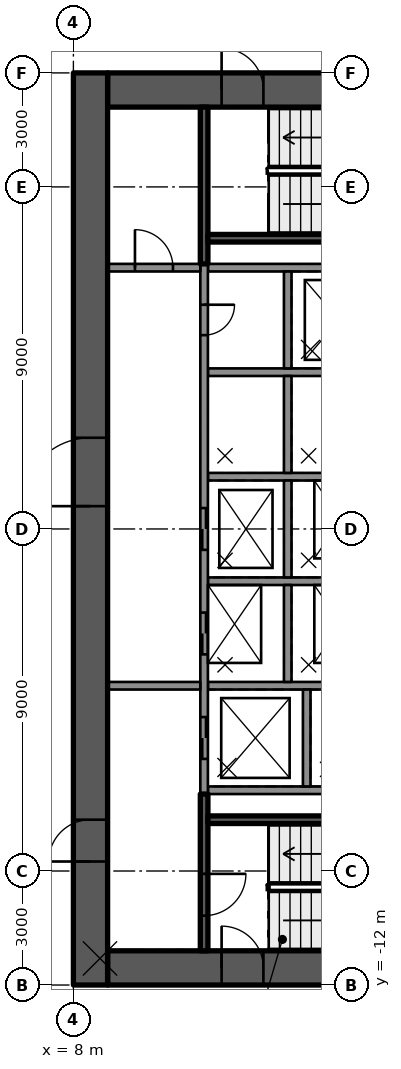
"""IFC4 building model, lengths in metres.
Left out: names, types, materials, properties, quantities, classifications, styles, units other than length and angle.
Written with IfcOpenShell. Run it as: python <this file> out.ifc"""

import sys

from ifc_helpers import new_model, si_unit, direction, frame, frame_2d, origin, place, context, subcontext, project, spatial, rectangle, extrude, element, fill, save


model = new_model("IFC4")
c1 = context("Model", 3, precision=1e-05, world=origin(), true_north=direction((0.0, 1.0)))
c2 = subcontext(c1, "Body", "Model", "MODEL_VIEW")
j1 = project(units=[si_unit("LENGTHUNIT", "METRE"), si_unit("PLANEANGLEUNIT", "RADIAN")], contexts=[c1])
p1 = place(None, origin())
s1 = spatial("IfcSite", under=j1, at=p1, CompositionType="ELEMENT")
p2 = place(p1, origin())
s2 = spatial("IfcBuilding", under=s1, at=p2, CompositionType="ELEMENT")
p3 = place(p2, frame((0.0, 0.0, 58.8)))
s3 = spatial("IfcBuildingStorey", under=s2, at=p3, CompositionType="ELEMENT", Elevation=58.8)
p4 = place(p3, frame((8.9, 11.55, 0.0), z_axis=(0.0, 0.0, 1.0), x_axis=(1.0, 0.0, 0.0)))
e1 = element("IfcWall", 1, at=p4, inside=s3, PredefinedType="SHEAR", context=c2, shape_type="SweptSolid", body=[
    extrude(rectangle(XDim=9.2, YDim=0.9, at=frame_2d((4.6, 0.0))), origin(), (0.0, 0.0, 1.0), 3.5),
])
p5 = place(p4, frame((3.0, 0.0, 0.0)))
e2 = element("IfcOpeningElement", 2, at=p5, cuts=e1, PredefinedType="OPENING", context=c2, shape_type="SweptSolid", body=[
    extrude(rectangle(XDim=1.1, YDim=2.1, at=frame_2d((0.55, 1.05))), frame((0.0, 0.46, 0.0), z_axis=(0.0, -1.0, 0.0), x_axis=(1.0, 0.0, 0.0)), (0.0, 0.0, 1.0), 0.92),
])
p6 = place(p3, frame((8.9, -11.55, 0.0), z_axis=(0.0, 0.0, 1.0), x_axis=(1.0, 0.0, 0.0)))
e3 = element("IfcWall", 3, at=p6, inside=s3, PredefinedType="SHEAR", context=c2, shape_type="SweptSolid", body=[
    extrude(rectangle(XDim=9.2, YDim=0.9, at=frame_2d((4.6, 0.0))), origin(), (0.0, 0.0, 1.0), 3.5),
])
p7 = place(p6, frame((3.0, 0.0, 0.0)))
e4 = element("IfcOpeningElement", 4, at=p7, cuts=e3, PredefinedType="OPENING", context=c2, shape_type="SweptSolid", body=[
    extrude(rectangle(XDim=1.1, YDim=2.1, at=frame_2d((0.55, 1.05))), frame((0.0, 0.46, 0.0), z_axis=(0.0, -1.0, 0.0), x_axis=(1.0, 0.0, 0.0)), (0.0, 0.0, 1.0), 0.92),
])
p8 = place(p3, frame((8.45, -12.0, 0.0), z_axis=(0.0, 0.0, 1.0), x_axis=(0.0, 1.0, 0.0)))
e5 = element("IfcWall", 5, at=p8, inside=s3, PredefinedType="SHEAR", context=c2, shape_type="SweptSolid", body=[
    extrude(rectangle(XDim=24.0, YDim=0.9, at=frame_2d((12.0, 0.0))), origin(), (0.0, 0.0, 1.0), 3.5),
])
p9 = place(p8, frame((12.6, 0.0, 0.0)))
e6 = element("IfcOpeningElement", 6, at=p9, cuts=e5, PredefinedType="OPENING", context=c2, shape_type="SweptSolid", body=[
    extrude(rectangle(XDim=1.8, YDim=2.1, at=frame_2d((0.9, 1.05))), frame((0.0, 0.46, 0.0), z_axis=(0.0, -1.0, 0.0), x_axis=(1.0, 0.0, 0.0)), (0.0, 0.0, 1.0), 0.92),
])
p10 = place(p8, frame((3.25, 0.0, 0.0)))
e7 = element("IfcOpeningElement", 7, at=p10, cuts=e5, PredefinedType="OPENING", context=c2, shape_type="SweptSolid", body=[
    extrude(rectangle(XDim=1.1, YDim=2.1, at=frame_2d((0.55, 1.05))), frame((0.0, 0.46, 0.0), z_axis=(0.0, -1.0, 0.0), x_axis=(1.0, 0.0, 0.0)), (0.0, 0.0, 1.0), 0.92),
])
for number, where, z_axis, x_axis in (
    (8, (11.54, -6.875, 0.0), (0.0, 0.0, 1.0), (1.0, 0.0, 0.0)),
    (9, (11.54, 6.875, 0.0), (0.0, 0.0, 1.0), (1.0, 0.0, 0.0)),
):
    element("IfcWall", number, at=place(p3, frame(where, z_axis=z_axis, x_axis=x_axis)), inside=s3, PredefinedType="SOLIDWALL", context=c2, shape_type="SweptSolid", body=[
        extrude(rectangle(XDim=6.56, YDim=0.2, at=frame_2d((3.28, 0.0))), origin(), (0.0, 0.0, 1.0), 3.09),
    ])
p11 = place(p3, frame((11.54, 4.125, 0.0), z_axis=(0.0, 0.0, 1.0), x_axis=(1.0, 0.0, 0.0)))
e10 = element("IfcWall", 10, at=p11, inside=s3, PredefinedType="SOLIDWALL", context=c2, shape_type="SweptSolid", body=[
    extrude(rectangle(XDim=4.7, YDim=0.2, at=frame_2d((2.35, 0.0))), origin(), (0.0, 0.0, 1.0), 3.09),
])
for number, where, z_axis, x_axis in (
    (11, (11.54, 1.375, 0.0), (0.0, 0.0, 1.0), (1.0, 0.0, 0.0)),
    (12, (11.54, -1.375, 0.0), (0.0, 0.0, 1.0), (1.0, 0.0, 0.0)),
):
    element("IfcWall", number, at=place(p3, frame(where, z_axis=z_axis, x_axis=x_axis)), inside=s3, PredefinedType="SOLIDWALL", context=c2, shape_type="SweptSolid", body=[
        extrude(rectangle(XDim=4.2, YDim=0.2, at=frame_2d((2.1, 0.0))), origin(), (0.0, 0.0, 1.0), 3.09),
    ])
p12 = place(p3, frame((11.54, -4.125, 0.0), z_axis=(0.0, 0.0, 1.0), x_axis=(1.0, 0.0, 0.0)))
e13 = element("IfcWall", 13, at=p12, inside=s3, PredefinedType="SOLIDWALL", context=c2, shape_type="SweptSolid", body=[
    extrude(rectangle(XDim=4.7, YDim=0.2, at=frame_2d((2.35, 0.0))), origin(), (0.0, 0.0, 1.0), 3.09),
])
p13 = place(p3, frame((11.44, 6.975, 0.0), z_axis=(0.0, 0.0, 1.0), x_axis=(0.0, -1.0, 0.0)))
e14 = element("IfcWall", 14, at=p13, inside=s3, PredefinedType="SOLIDWALL", context=c2, shape_type="SweptSolid", body=[
    extrude(rectangle(XDim=13.95, YDim=0.2, at=frame_2d((6.975, 0.0))), origin(), (0.0, 0.0, 1.0), 3.09),
])
p14 = place(p13, frame((6.425, 0.0, 0.0)))
e15 = element("IfcOpeningElement", 15, at=p14, cuts=e14, PredefinedType="OPENING", context=c2, shape_type="SweptSolid", body=[
    extrude(rectangle(XDim=1.1, YDim=2.1, at=frame_2d((0.55, 1.05))), frame((0.0, 0.11, 0.0), z_axis=(0.0, -1.0, 0.0), x_axis=(1.0, 0.0, 0.0)), (0.0, 0.0, 1.0), 0.22),
])
p15 = place(p13, frame((9.175, 0.0, 0.0)))
e16 = element("IfcOpeningElement", 16, at=p15, cuts=e14, PredefinedType="OPENING", context=c2, shape_type="SweptSolid", body=[
    extrude(rectangle(XDim=1.1, YDim=2.1, at=frame_2d((0.55, 1.05))), frame((0.0, 0.11, 0.0), z_axis=(0.0, -1.0, 0.0), x_axis=(1.0, 0.0, 0.0)), (0.0, 0.0, 1.0), 0.22),
])
p16 = place(p13, frame((11.925, 0.0, 0.0)))
e17 = element("IfcOpeningElement", 17, at=p16, cuts=e14, PredefinedType="OPENING", context=c2, shape_type="SweptSolid", body=[
    extrude(rectangle(XDim=1.1, YDim=2.1, at=frame_2d((0.55, 1.05))), frame((0.0, 0.11, 0.0), z_axis=(0.0, -1.0, 0.0), x_axis=(1.0, 0.0, 0.0)), (0.0, 0.0, 1.0), 0.22),
])
p17 = place(p13, frame((1.075, 0.0, 0.0)))
e18 = element("IfcOpeningElement", 18, at=p17, cuts=e14, PredefinedType="OPENING", context=c2, shape_type="SweptSolid", body=[
    extrude(rectangle(XDim=0.8, YDim=2.1, at=frame_2d((0.4, 1.05))), frame((0.0, 0.11, 0.0), z_axis=(0.0, -1.0, 0.0), x_axis=(1.0, 0.0, 0.0)), (0.0, 0.0, 1.0), 0.22),
])
for number, where, z_axis, x_axis in (
    (19, (13.64, 6.775, 0.0), (0.0, 0.0, 1.0), (0.0, -1.0, 0.0)),
    (20, (13.64, 4.025, 0.0), (0.0, 0.0, 1.0), (0.0, -1.0, 0.0)),
    (21, (13.64, 1.275, 0.0), (0.0, 0.0, 1.0), (0.0, -1.0, 0.0)),
    (22, (13.64, -1.475, 0.0), (0.0, 0.0, 1.0), (0.0, -1.0, 0.0)),
    (23, (14.14, -4.225, 0.0), (0.0, 0.0, 1.0), (0.0, -1.0, 0.0)),
):
    element("IfcWall", number, at=place(p3, frame(where, z_axis=z_axis, x_axis=x_axis)), inside=s3, PredefinedType="SOLIDWALL", context=c2, shape_type="SweptSolid", body=[
        extrude(rectangle(XDim=2.55, YDim=0.2, at=frame_2d((1.275, 0.0))), origin(), (0.0, 0.0, 1.0), 3.09),
    ])
p18 = place(p3, frame((11.44, -6.975, 0.0), z_axis=(0.0, 0.0, 1.0), x_axis=(0.0, -1.0, 0.0)))
e24 = element("IfcWall", 24, at=p18, inside=s3, PredefinedType="SOLIDWALL", context=c2, shape_type="SweptSolid", body=[
    extrude(rectangle(XDim=4.125, YDim=0.2, at=frame_2d((2.062, 0.0))), origin(), (0.0, 0.0, 1.0), 3.09),
])
p19 = place(p18, frame((2.1, 0.0, 0.0)))
e25 = element("IfcOpeningElement", 25, at=p19, cuts=e24, PredefinedType="OPENING", context=c2, shape_type="SweptSolid", body=[
    extrude(rectangle(XDim=1.1, YDim=2.1, at=frame_2d((0.55, 1.05))), frame((0.0, 0.11, 0.0), z_axis=(0.0, -1.0, 0.0), x_axis=(1.0, 0.0, 0.0)), (0.0, 0.0, 1.0), 0.22),
])
p20 = place(p3, frame((11.54, -7.65, 0.0), z_axis=(0.0, 0.0, 1.0), x_axis=(1.0, 0.0, 0.0)))
e26 = element("IfcWall", 26, at=p20, inside=s3, PredefinedType="SOLIDWALL", context=c2, shape_type="SweptSolid", body=[
    extrude(rectangle(XDim=6.56, YDim=0.2, at=frame_2d((3.28, 0.0))), origin(), (0.0, 0.0, 1.0), 3.09),
])
p21 = place(p3, frame((11.44, 11.1, 0.0), z_axis=(0.0, 0.0, 1.0), x_axis=(0.0, -1.0, 0.0)))
e27 = element("IfcWall", 27, at=p21, inside=s3, PredefinedType="SOLIDWALL", context=c2, shape_type="SweptSolid", body=[
    extrude(rectangle(XDim=4.125, YDim=0.2, at=frame_2d((2.062, 0.0))), origin(), (0.0, 0.0, 1.0), 3.09),
])
p22 = place(p3, frame((11.54, 7.65, 0.0), z_axis=(0.0, 0.0, 1.0), x_axis=(1.0, 0.0, 0.0)))
e28 = element("IfcWall", 28, at=p22, inside=s3, PredefinedType="SOLIDWALL", context=c2, shape_type="SweptSolid", body=[
    extrude(rectangle(XDim=6.56, YDim=0.2, at=frame_2d((3.28, 0.0))), origin(), (0.0, 0.0, 1.0), 3.09),
])
p23 = place(p3, frame((8.9, -4.125, 0.0), z_axis=(0.0, 0.0, 1.0), x_axis=(1.0, 0.0, 0.0)))
e29 = element("IfcWall", 29, at=p23, inside=s3, PredefinedType="PARTITIONING", context=c2, shape_type="SweptSolid", body=[
    extrude(rectangle(XDim=2.44, YDim=0.2, at=frame_2d((1.22, 0.0))), origin(), (0.0, 0.0, 1.0), 3.09),
])
p24 = place(p3, frame((8.9, 6.875, 0.0), z_axis=(0.0, 0.0, 1.0), x_axis=(1.0, 0.0, 0.0)))
e30 = element("IfcWall", 30, at=p24, inside=s3, PredefinedType="PARTITIONING", context=c2, shape_type="SweptSolid", body=[
    extrude(rectangle(XDim=2.44, YDim=0.2, at=frame_2d((1.22, 0.0))), origin(), (0.0, 0.0, 1.0), 3.09),
])
p25 = place(p24, frame((0.72, 0.0, 0.0)))
e31 = element("IfcOpeningElement", 31, at=p25, cuts=e30, PredefinedType="OPENING", context=c2, shape_type="SweptSolid", body=[
    extrude(rectangle(XDim=1.0, YDim=2.1, at=frame_2d((0.5, 1.05))), frame((0.0, 0.11, 0.0), z_axis=(0.0, -1.0, 0.0), x_axis=(1.0, 0.0, 0.0)), (0.0, 0.0, 1.0), 0.22),
])
p26 = place(p14, origin())
e32 = element("IfcDoor", 32, at=p26, inside=s3, OperationType="DOUBLE_DOOR_SLIDING", PredefinedType="DOOR", context=c2, shape_type="SweptSolid", body=[
    extrude(rectangle(XDim=1.1, YDim=2.1, at=frame_2d((0.55, 1.05))), frame((0.0, 0.025, 0.0), z_axis=(0.0, -1.0, 0.0), x_axis=(1.0, 0.0, 0.0)), (0.0, 0.0, 1.0), 0.05),
])
fill(e15, e32)
p27 = place(p15, origin())
e33 = element("IfcDoor", 33, at=p27, inside=s3, OperationType="DOUBLE_DOOR_SLIDING", PredefinedType="DOOR", context=c2, shape_type="SweptSolid", body=[
    extrude(rectangle(XDim=1.1, YDim=2.1, at=frame_2d((0.55, 1.05))), frame((0.0, 0.025, 0.0), z_axis=(0.0, -1.0, 0.0), x_axis=(1.0, 0.0, 0.0)), (0.0, 0.0, 1.0), 0.05),
])
fill(e16, e33)
p28 = place(p16, origin())
e34 = element("IfcDoor", 34, at=p28, inside=s3, OperationType="DOUBLE_DOOR_SLIDING", PredefinedType="DOOR", context=c2, shape_type="SweptSolid", body=[
    extrude(rectangle(XDim=1.1, YDim=2.1, at=frame_2d((0.55, 1.05))), frame((0.0, 0.025, 0.0), z_axis=(0.0, -1.0, 0.0), x_axis=(1.0, 0.0, 0.0)), (0.0, 0.0, 1.0), 0.05),
])
fill(e17, e34)
p29 = place(p17, origin())
e35 = element("IfcDoor", 35, at=p29, inside=s3, OperationType="SINGLE_SWING_LEFT", PredefinedType="DOOR", context=c2, shape_type="SweptSolid", body=[
    extrude(rectangle(XDim=0.8, YDim=2.1, at=frame_2d((0.4, 1.05))), frame((0.0, 0.025, 0.0), z_axis=(0.0, -1.0, 0.0), x_axis=(1.0, 0.0, 0.0)), (0.0, 0.0, 1.0), 0.05),
])
fill(e18, e35)
p30 = place(p9, origin())
e36 = element("IfcDoor", 36, at=p30, inside=s3, OperationType="SINGLE_SWING_RIGHT", PredefinedType="DOOR", context=c2, shape_type="SweptSolid", body=[
    extrude(rectangle(XDim=1.8, YDim=2.1, at=frame_2d((0.9, 1.05))), frame((0.0, 0.025, 0.0), z_axis=(0.0, -1.0, 0.0), x_axis=(1.0, 0.0, 0.0)), (0.0, 0.0, 1.0), 0.05),
])
fill(e6, e36)
p31 = place(p10, origin())
e37 = element("IfcDoor", 37, at=p31, inside=s3, OperationType="SINGLE_SWING_LEFT", PredefinedType="DOOR", context=c2, shape_type="SweptSolid", body=[
    extrude(rectangle(XDim=1.1, YDim=2.1, at=frame_2d((0.55, 1.05))), frame((0.0, 0.025, 0.0), z_axis=(0.0, -1.0, 0.0), x_axis=(1.0, 0.0, 0.0)), (0.0, 0.0, 1.0), 0.05),
])
fill(e7, e37)
p32 = place(p7, origin())
e38 = element("IfcDoor", 38, at=p32, inside=s3, OperationType="SINGLE_SWING_LEFT", PredefinedType="DOOR", context=c2, shape_type="SweptSolid", body=[
    extrude(rectangle(XDim=1.1, YDim=2.1, at=frame_2d((0.55, 1.05))), frame((0.0, 0.025, 0.0), z_axis=(0.0, -1.0, 0.0), x_axis=(1.0, 0.0, 0.0)), (0.0, 0.0, 1.0), 0.05),
])
fill(e4, e38)
p33 = place(p5, origin())
e39 = element("IfcDoor", 39, at=p33, inside=s3, OperationType="SINGLE_SWING_LEFT", PredefinedType="DOOR", context=c2, shape_type="SweptSolid", body=[
    extrude(rectangle(XDim=1.1, YDim=2.1, at=frame_2d((0.55, 1.05))), frame((0.0, 0.025, 0.0), z_axis=(0.0, -1.0, 0.0), x_axis=(1.0, 0.0, 0.0)), (0.0, 0.0, 1.0), 0.05),
])
fill(e2, e39)
p34 = place(p19, origin())
e40 = element("IfcDoor", 40, at=p34, inside=s3, OperationType="SINGLE_SWING_RIGHT", PredefinedType="DOOR", context=c2, shape_type="SweptSolid", body=[
    extrude(rectangle(XDim=1.1, YDim=2.1, at=frame_2d((0.55, 1.05))), frame((0.0, 0.025, 0.0), z_axis=(0.0, -1.0, 0.0), x_axis=(1.0, 0.0, 0.0)), (0.0, 0.0, 1.0), 0.05),
])
fill(e25, e40)
p35 = place(p25, origin())
e41 = element("IfcDoor", 41, at=p35, inside=s3, OperationType="SINGLE_SWING_RIGHT", PredefinedType="DOOR", context=c2, shape_type="SweptSolid", body=[
    extrude(rectangle(XDim=1.0, YDim=2.1, at=frame_2d((0.5, 1.05))), frame((0.0, 0.025, 0.0), z_axis=(0.0, -1.0, 0.0), x_axis=(1.0, 0.0, 0.0)), (0.0, 0.0, 1.0), 0.05),
])
fill(e31, e41)
save(model, sys.argv[1])
